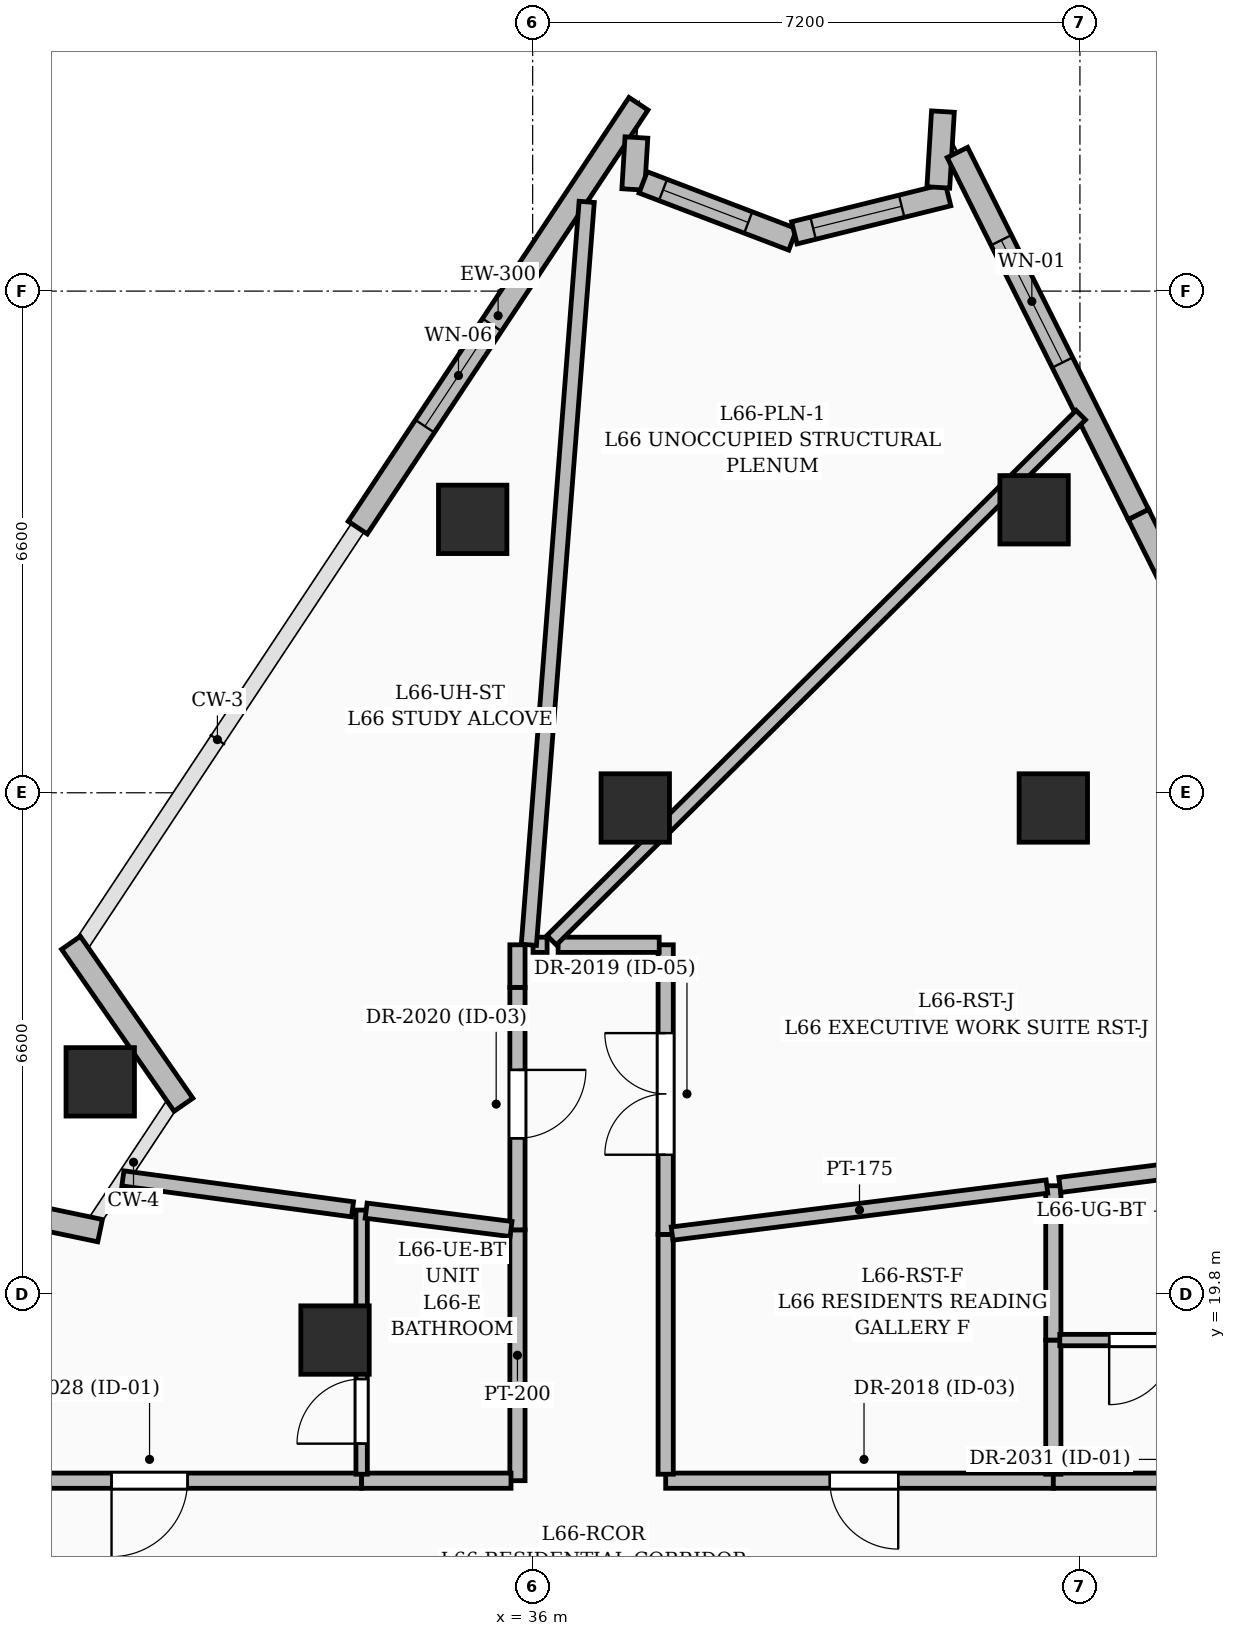
"""IFC4 building model, lengths in metres.
Left out: names, types, materials, properties, quantities, classifications, styles, units other than length and angle.
Written with IfcOpenShell. Run it as: python <this file> out.ifc"""

import sys

from ifc_helpers import new_model, si_unit, direction, frame, frame_2d, origin, origin_2d, place, context, subcontext, project, spatial, rectangle, extrude, element, fill, save


model = new_model("IFC4")
c1 = context("Model", 3, precision=1e-05, world=origin(), true_north=direction((0.0, 1.0)))
c2 = subcontext(c1, "Body", "Model", "MODEL_VIEW")
j1 = project(units=[si_unit("LENGTHUNIT", "METRE"), si_unit("PLANEANGLEUNIT", "RADIAN")], contexts=[c1])
p1 = place(None, origin())
s1 = spatial("IfcSite", under=j1, at=p1, CompositionType="ELEMENT")
p2 = place(p1, origin())
s2 = spatial("IfcBuilding", under=s1, at=p2, CompositionType="ELEMENT")
p3 = place(p2, frame((0.0, 0.0, 255.75)))
s3 = spatial("IfcBuildingStorey", under=s2, at=p3, CompositionType="ELEMENT", Elevation=255.75)
for number, where, z_axis, x_axis in (
    (1, (42.85, 26.2, 0.0), (0.0, 0.0, 1.0), (1.0, 0.0, 0.0)),
    (2, (37.35, 26.2, 0.0), (0.0, 0.0, 1.0), (1.0, 0.0, 0.0)),
    (3, (33.4, 19.2, 0.0), (0.0, 0.0, 1.0), (1.0, 0.0, 0.0)),
    (4, (42.597, 30.123, 0.0), (0.0, 0.0, 1.0), (1.0, 0.0, 0.0)),
    (5, (35.211, 29.997, 0.0), (0.0, 0.0, 1.0), (1.0, 0.0, 0.0)),
    (6, (30.311, 22.597, 0.0), (0.0, 0.0, 1.0), (1.0, 0.0, 0.0)),
):
    element("IfcColumn", number, at=place(p3, frame(where, z_axis=z_axis, x_axis=x_axis)), inside=s3, PredefinedType="COLUMN", context=c2, shape_type="SweptSolid", body=[
        extrude(rectangle(XDim=0.9, YDim=0.9, at=origin_2d()), origin(), (0.0, 0.0, 1.0), 3.75),
    ])
p4 = place(p3, frame((27.771, 21.171, 0.0), z_axis=(0.0, 0.0, 1.0), x_axis=(0.978788869041, -0.204871544732, 0.0)))
e7 = element("IfcWall", 7, at=p4, inside=s3, PredefinedType="SOLIDWALL", context=c2, shape_type="SweptSolid", body=[
    extrude(rectangle(XDim=2.593, YDim=0.3, at=frame_2d((1.296, 0.0))), origin(), (0.0, 0.0, 1.0), 2.825),
])
p5 = place(p4, frame((0.675, 0.0, 0.8)))
e8 = element("IfcOpeningElement", 8, at=p5, cuts=e7, PredefinedType="OPENING", context=c2, shape_type="SweptSolid", body=[
    extrude(rectangle(XDim=1.2, YDim=1.8, at=frame_2d((0.6, 0.9))), frame((0.0, 0.16, 0.0), z_axis=(0.0, -1.0, 0.0), x_axis=(1.0, 0.0, 0.0)), (0.0, 0.0, 1.0), 0.32),
])
p6 = place(p3, frame((31.406, 22.296, 0.0), z_axis=(0.0, 0.0, 1.0), x_axis=(-0.570584534013, 0.821238874838, 0.0)))
e9 = element("IfcWall", 9, at=p6, inside=s3, PredefinedType="SOLIDWALL", context=c2, shape_type="SweptSolid", body=[
    extrude(rectangle(XDim=2.594, YDim=0.3, at=frame_2d((1.297, 0.0))), origin(), (0.0, 0.0, 1.0), 2.825),
])
p7 = place(p3, frame((33.699, 29.888, 0.0), z_axis=(0.0, 0.0, 1.0), x_axis=(0.552111744248, 0.833770125312, 0.0)))
e10 = element("IfcWall", 10, at=p7, inside=s3, PredefinedType="SOLIDWALL", context=c2, shape_type="SweptSolid", body=[
    extrude(rectangle(XDim=6.689, YDim=0.3, at=frame_2d((3.344, 0.0))), origin(), (0.0, 0.0, 1.0), 3.5),
])
p8 = place(p7, frame((1.6, 0.0, 0.55)))
e11 = element("IfcOpeningElement", 11, at=p8, cuts=e10, PredefinedType="OPENING", context=c2, shape_type="SweptSolid", body=[
    extrude(rectangle(XDim=1.6, YDim=2.2, at=frame_2d((0.8, 1.1))), frame((0.0, 0.16, 0.0), z_axis=(0.0, -1.0, 0.0), x_axis=(1.0, 0.0, 0.0)), (0.0, 0.0, 1.0), 0.32),
])
p9 = place(p3, frame((37.365, 35.021, 0.0), z_axis=(0.0, 0.0, 1.0), x_axis=(-0.060624262888, -0.998160657785, 0.0)))
e12 = element("IfcWall", 12, at=p9, inside=s3, PredefinedType="SOLIDWALL", context=c2, shape_type="SweptSolid", body=[
    extrude(rectangle(XDim=0.685, YDim=0.3, at=frame_2d((0.342, 0.0))), origin(), (0.0, 0.0, 1.0), 3.5),
])
p10 = place(p3, frame((37.454, 34.431, 0.0), z_axis=(0.0, 0.0, 1.0), x_axis=(0.934285742141, -0.356525107155, 0.0)))
e13 = element("IfcWall", 13, at=p10, inside=s3, PredefinedType="SOLIDWALL", context=c2, shape_type="SweptSolid", body=[
    extrude(rectangle(XDim=2.108, YDim=0.3, at=frame_2d((1.054, 0.0))), origin(), (0.0, 0.0, 1.0), 3.5),
])
p11 = place(p10, frame((0.28, 0.0, 0.8)))
e14 = element("IfcOpeningElement", 14, at=p11, cuts=e13, PredefinedType="OPENING", context=c2, shape_type="SweptSolid", body=[
    extrude(rectangle(XDim=1.2, YDim=1.8, at=frame_2d((0.6, 0.9))), frame((0.0, 0.16, 0.0), z_axis=(0.0, -1.0, 0.0), x_axis=(1.0, 0.0, 0.0)), (0.0, 0.0, 1.0), 0.32),
])
p12 = place(p3, frame((39.442, 33.766, 0.0), z_axis=(0.0, 0.0, 1.0), x_axis=(0.970636719037, 0.240550118805, 0.0)))
e15 = element("IfcWall", 15, at=p12, inside=s3, PredefinedType="SOLIDWALL", context=c2, shape_type="SweptSolid", body=[
    extrude(rectangle(XDim=2.084, YDim=0.3, at=frame_2d((1.042, 0.0))), origin(), (0.0, 0.0, 1.0), 3.5),
])
p13 = place(p12, frame((0.255, 0.0, 0.8)))
e16 = element("IfcOpeningElement", 16, at=p13, cuts=e15, PredefinedType="OPENING", context=c2, shape_type="SweptSolid", body=[
    extrude(rectangle(XDim=1.2, YDim=1.8, at=frame_2d((0.6, 0.9))), frame((0.0, 0.16, 0.0), z_axis=(0.0, -1.0, 0.0), x_axis=(1.0, 0.0, 0.0)), (0.0, 0.0, 1.0), 0.32),
])
p14 = place(p3, frame((41.337, 34.364, 0.0), z_axis=(0.0, 0.0, 1.0), x_axis=(0.060554036278, 0.998164920587, 0.0)))
e17 = element("IfcWall", 17, at=p14, inside=s3, PredefinedType="SOLIDWALL", context=c2, shape_type="SweptSolid", body=[
    extrude(rectangle(XDim=1.0, YDim=0.3, at=frame_2d((0.5, 0.0))), origin(), (0.0, 0.0, 1.0), 3.5),
])
p15 = place(p3, frame((41.588, 34.824, 0.0), z_axis=(0.0, 0.0, 1.0), x_axis=(0.4472135955, -0.894427191, 0.0)))
e18 = element("IfcWall", 18, at=p15, inside=s3, PredefinedType="SOLIDWALL", context=c2, shape_type="SweptSolid", body=[
    extrude(rectangle(XDim=5.326, YDim=0.3, at=frame_2d((2.663, 0.0))), origin(), (0.0, 0.0, 1.0), 3.5),
])
p16 = place(p15, frame((1.29, 0.0, 0.6)))
e19 = element("IfcOpeningElement", 19, at=p16, cuts=e18, PredefinedType="OPENING", context=c2, shape_type="SweptSolid", body=[
    extrude(rectangle(XDim=1.8, YDim=2.1, at=frame_2d((0.9, 1.05))), frame((0.0, 0.16, 0.0), z_axis=(0.0, -1.0, 0.0), x_axis=(1.0, 0.0, 0.0)), (0.0, 0.0, 1.0), 0.32),
])
p17 = place(p3, frame((43.97, 30.06, 0.0), z_axis=(0.0, 0.0, 1.0), x_axis=(0.447246638907, -0.894410668534, 0.0)))
e20 = element("IfcWall", 20, at=p17, inside=s3, PredefinedType="SOLIDWALL", context=c2, shape_type="SweptSolid", body=[
    extrude(rectangle(XDim=5.911, YDim=0.3, at=frame_2d((2.955, 0.0))), origin(), (0.0, 0.0, 1.0), 3.5),
])
p18 = place(p17, frame((2.1, 0.0, 0.55)))
e21 = element("IfcOpeningElement", 21, at=p18, cuts=e20, PredefinedType="OPENING", context=c2, shape_type="SweptSolid", body=[
    extrude(rectangle(XDim=1.6, YDim=2.2, at=frame_2d((0.8, 1.1))), frame((0.0, 0.16, 0.0), z_axis=(0.0, -1.0, 0.0), x_axis=(1.0, 0.0, 0.0)), (0.0, 0.0, 1.0), 0.32),
])
p19 = place(p3, frame((33.75, 17.35, 0.0), z_axis=(0.0, 0.0, 1.0), x_axis=(-1.0, 0.0, 0.0)))
e22 = element("IfcWall", 22, at=p19, inside=s3, PredefinedType="PARTITIONING", context=c2, shape_type="SweptSolid", body=[
    extrude(rectangle(XDim=5.7, YDim=0.2, at=frame_2d((2.85, 0.0))), origin(), (0.0, 0.0, 1.0), 3.5),
])
p20 = place(p19, frame((2.29, 0.0, 0.0)))
e23 = element("IfcOpeningElement", 23, at=p20, cuts=e22, PredefinedType="OPENING", context=c2, shape_type="SweptSolid", body=[
    extrude(rectangle(XDim=1.0, YDim=2.2, at=frame_2d((0.5, 1.1))), frame((0.0, 0.11, 0.0), z_axis=(0.0, -1.0, 0.0), x_axis=(1.0, 0.0, 0.0)), (0.0, 0.0, 1.0), 0.22),
])
p21 = place(p3, frame((35.8, 20.65, 0.0), z_axis=(0.0, 0.0, 1.0), x_axis=(0.0, -1.0, 0.0)))
e24 = element("IfcWall", 24, at=p21, inside=s3, PredefinedType="PARTITIONING", context=c2, shape_type="SweptSolid", body=[
    extrude(rectangle(XDim=3.3, YDim=0.2, at=frame_2d((1.65, 0.0))), origin(), (0.0, 0.0, 1.0), 3.5),
])
p22 = place(p3, frame((35.715, 17.35, 0.0), z_axis=(0.0, 0.0, 1.0), x_axis=(-1.0, 0.0, 0.0)))
e25 = element("IfcWall", 25, at=p22, inside=s3, PredefinedType="PARTITIONING", context=c2, shape_type="SweptSolid", body=[
    extrude(rectangle(XDim=1.965, YDim=0.2, at=frame_2d((0.982, 0.0))), origin(), (0.0, 0.0, 1.0), 2.685),
])
p23 = place(p3, frame((42.85, 17.35, 0.0), z_axis=(0.0, 0.0, 1.0), x_axis=(-1.0, 0.0, 0.0)))
e26 = element("IfcWall", 26, at=p23, inside=s3, PredefinedType="PARTITIONING", context=c2, shape_type="SweptSolid", body=[
    extrude(rectangle(XDim=5.1, YDim=0.2, at=frame_2d((2.55, 0.0))), origin(), (0.0, 0.0, 1.0), 3.5),
])
p24 = place(p23, frame((2.041, 0.0, 0.0)))
e27 = element("IfcOpeningElement", 27, at=p24, cuts=e26, PredefinedType="OPENING", context=c2, shape_type="SweptSolid", body=[
    extrude(rectangle(XDim=0.9, YDim=2.1, at=frame_2d((0.45, 1.05))), frame((0.0, 0.11, 0.0), z_axis=(0.0, -1.0, 0.0), x_axis=(1.0, 0.0, 0.0)), (0.0, 0.0, 1.0), 0.22),
])
p25 = place(p3, frame((37.75, 17.435, 0.0), z_axis=(0.0, 0.0, 1.0), x_axis=(0.0, 1.0, 0.0)))
e28 = element("IfcWall", 28, at=p25, inside=s3, PredefinedType="PARTITIONING", context=c2, shape_type="SweptSolid", body=[
    extrude(rectangle(XDim=3.155, YDim=0.2, at=frame_2d((1.578, 0.0))), origin(), (0.0, 0.0, 1.0), 3.5),
])
p26 = place(p3, frame((46.715, 17.35, 0.0), z_axis=(0.0, 0.0, 1.0), x_axis=(-1.0, 0.0, 0.0)))
e29 = element("IfcWall", 29, at=p26, inside=s3, PredefinedType="PARTITIONING", context=c2, shape_type="SweptSolid", body=[
    extrude(rectangle(XDim=3.865, YDim=0.2, at=frame_2d((1.933, 0.0))), origin(), (0.0, 0.0, 1.0), 2.685),
])
p27 = place(p26, frame((1.332, 0.0, 0.0)))
e30 = element("IfcOpeningElement", 30, at=p27, cuts=e29, PredefinedType="OPENING", context=c2, shape_type="SweptSolid", body=[
    extrude(rectangle(XDim=1.0, YDim=2.2, at=frame_2d((0.5, 1.1))), frame((0.0, 0.11, 0.0), z_axis=(0.0, -1.0, 0.0), x_axis=(1.0, 0.0, 0.0)), (0.0, 0.0, 1.0), 0.22),
])
p28 = place(p3, frame((35.8, 23.84, 0.0), z_axis=(0.0, 0.0, 1.0), x_axis=(0.0, -1.0, 0.0)))
e31 = element("IfcWall", 31, at=p28, inside=s3, PredefinedType="PARTITIONING", context=c2, shape_type="SweptSolid", body=[
    extrude(rectangle(XDim=3.19, YDim=0.2, at=frame_2d((1.595, 0.0))), origin(), (0.0, 0.0, 1.0), 2.685),
])
p29 = place(p28, frame((1.086, 0.0, 0.0)))
e32 = element("IfcOpeningElement", 32, at=p29, cuts=e31, PredefinedType="OPENING", context=c2, shape_type="SweptSolid", body=[
    extrude(rectangle(XDim=0.9, YDim=2.1, at=frame_2d((0.45, 1.05))), frame((0.0, 0.11, 0.0), z_axis=(0.0, -1.0, 0.0), x_axis=(1.0, 0.0, 0.0)), (0.0, 0.0, 1.0), 0.22),
])
p30 = place(p3, frame((35.8, 24.4, 0.0), z_axis=(0.0, 0.0, 1.0), x_axis=(0.0, -1.0, 0.0)))
e33 = element("IfcWall", 33, at=p30, inside=s3, PredefinedType="PARTITIONING", context=c2, shape_type="SweptSolid", body=[
    extrude(rectangle(XDim=0.56, YDim=0.2, at=frame_2d((0.28, 0.0))), origin(), (0.0, 0.0, 1.0), 2.685),
])
p31 = place(p3, frame((37.75, 20.59, 0.0), z_axis=(0.0, 0.0, 1.0), x_axis=(0.0, 1.0, 0.0)))
e34 = element("IfcWall", 34, at=p31, inside=s3, PredefinedType="PARTITIONING", context=c2, shape_type="SweptSolid", body=[
    extrude(rectangle(XDim=3.81, YDim=0.2, at=frame_2d((1.905, 0.0))), origin(), (0.0, 0.0, 1.0), 3.5),
])
p32 = place(p31, frame((1.048, 0.0, 0.0)))
e35 = element("IfcOpeningElement", 35, at=p32, cuts=e34, PredefinedType="OPENING", context=c2, shape_type="SweptSolid", body=[
    extrude(rectangle(XDim=1.6, YDim=2.3, at=frame_2d((0.8, 1.15))), frame((0.0, 0.11, 0.0), z_axis=(0.0, -1.0, 0.0), x_axis=(1.0, 0.0, 0.0)), (0.0, 0.0, 1.0), 0.22),
])
p33 = place(p3, frame((37.665, 24.4, 0.0), z_axis=(0.0, 0.0, 1.0), x_axis=(-1.0, 0.0, 0.0)))
e36 = element("IfcWall", 36, at=p33, inside=s3, PredefinedType="PARTITIONING", context=c2, shape_type="SweptSolid", body=[
    extrude(rectangle(XDim=1.33, YDim=0.2, at=frame_2d((0.665, 0.0))), origin(), (0.0, 0.0, 1.0), 2.685),
])
p34 = place(p3, frame((36.19, 24.4, 0.0), z_axis=(0.0, 0.0, 1.0), x_axis=(-1.0, 0.0, 0.0)))
e37 = element("IfcWall", 37, at=p34, inside=s3, PredefinedType="PARTITIONING", context=c2, shape_type="SweptSolid", body=[
    extrude(rectangle(XDim=0.185, YDim=0.2, at=frame_2d((0.093, 0.0))), origin(), (0.0, 0.0, 1.0), 2.685),
])
p35 = place(p3, frame((33.75, 17.435, 0.0), z_axis=(0.0, 0.0, 1.0), x_axis=(0.0, 1.0, 0.0)))
e38 = element("IfcWall", 38, at=p35, inside=s3, PredefinedType="PARTITIONING", context=c2, shape_type="SweptSolid", body=[
    extrude(rectangle(XDim=3.475, YDim=0.15, at=frame_2d((1.737, 0.0))), origin(), (0.0, 0.0, 1.0), 2.685),
])
p36 = place(p35, frame((0.402, 0.0, 0.0)))
e39 = element("IfcOpeningElement", 39, at=p36, cuts=e38, PredefinedType="OPENING", context=c2, shape_type="SweptSolid", body=[
    extrude(rectangle(XDim=0.85, YDim=2.1, at=frame_2d((0.425, 1.05))), frame((0.0, 0.085, 0.0), z_axis=(0.0, -1.0, 0.0), x_axis=(1.0, 0.0, 0.0)), (0.0, 0.0, 1.0), 0.17),
])
p37 = place(p3, frame((33.63, 20.92, 0.0), z_axis=(0.0, 0.0, 1.0), x_axis=(-0.991047215952, 0.13351185623, 0.0)))
e40 = element("IfcWall", 40, at=p37, inside=s3, PredefinedType="PARTITIONING", context=c2, shape_type="SweptSolid", body=[
    extrude(rectangle(XDim=3.048, YDim=0.2, at=frame_2d((1.524, 0.0))), origin(), (0.0, 0.0, 1.0), 2.764),
])
p38 = place(p3, frame((35.716, 20.661, 0.0), z_axis=(0.0, 0.0, 1.0), x_axis=(-0.992041540235, 0.125911010037, 0.0)))
e41 = element("IfcWall", 41, at=p38, inside=s3, PredefinedType="PARTITIONING", context=c2, shape_type="SweptSolid", body=[
    extrude(rectangle(XDim=1.922, YDim=0.2, at=frame_2d((0.961, 0.0))), origin(), (0.0, 0.0, 1.0), 2.685),
])
p39 = place(p3, frame((42.85, 17.435, 0.0), z_axis=(0.0, 0.0, 1.0), x_axis=(0.0, 1.0, 0.0)))
e42 = element("IfcWall", 42, at=p39, inside=s3, PredefinedType="PARTITIONING", context=c2, shape_type="SweptSolid", body=[
    extrude(rectangle(XDim=1.765, YDim=0.2, at=frame_2d((0.882, 0.0))), origin(), (0.0, 0.0, 1.0), 3.5),
])
p40 = place(p3, frame((42.85, 19.2, 0.0), z_axis=(0.0, 0.0, 1.0), x_axis=(0.0, 1.0, 0.0)))
e43 = element("IfcWall", 43, at=p40, inside=s3, PredefinedType="PARTITIONING", context=c2, shape_type="SweptSolid", body=[
    extrude(rectangle(XDim=2.03, YDim=0.2, at=frame_2d((1.015, 0.0))), origin(), (0.0, 0.0, 1.0), 3.5),
])
p41 = place(p3, frame((42.766, 21.219, 0.0), z_axis=(0.0, 0.0, 1.0), x_axis=(-0.992216542226, -0.124524428662, 0.0)))
e44 = element("IfcWall", 44, at=p41, inside=s3, PredefinedType="PARTITIONING", context=c2, shape_type="SweptSolid", body=[
    extrude(rectangle(XDim=4.97, YDim=0.175, at=frame_2d((2.485, 0.0))), origin(), (0.0, 0.0, 1.0), 3.5),
])
p42 = place(p3, frame((45.05, 19.2, 0.0), z_axis=(0.0, 0.0, 1.0), x_axis=(-1.0, 0.0, 0.0)))
e45 = element("IfcWall", 45, at=p42, inside=s3, PredefinedType="PARTITIONING", context=c2, shape_type="SweptSolid", body=[
    extrude(rectangle(XDim=2.115, YDim=0.15, at=frame_2d((1.058, 0.0))), origin(), (0.0, 0.0, 1.0), 3.5),
])
p43 = place(p42, frame((0.615, 0.0, 0.0)))
e46 = element("IfcOpeningElement", 46, at=p43, cuts=e45, PredefinedType="OPENING", context=c2, shape_type="SweptSolid", body=[
    extrude(rectangle(XDim=0.85, YDim=2.1, at=frame_2d((0.425, 1.05))), frame((0.0, 0.085, 0.0), z_axis=(0.0, -1.0, 0.0), x_axis=(1.0, 0.0, 0.0)), (0.0, 0.0, 1.0), 0.17),
])
p44 = place(p3, frame((44.99, 21.502, 0.0), z_axis=(0.0, 0.0, 1.0), x_axis=(-0.991996302331, -0.126266924258, 0.0)))
e47 = element("IfcWall", 47, at=p44, inside=s3, PredefinedType="PARTITIONING", context=c2, shape_type="SweptSolid", body=[
    extrude(rectangle(XDim=2.073, YDim=0.2, at=frame_2d((1.036, 0.0))), origin(), (0.0, 0.0, 1.0), 2.685),
])
p45 = place(p3, frame((35.95, 24.4, 0.0), z_axis=(0.0, 0.0, 1.0), x_axis=(0.077621970398, 0.996982863299, 0.0)))
e48 = element("IfcWall", 48, at=p45, inside=s3, PredefinedType="PARTITIONING", context=c2, shape_type="SweptSolid", body=[
    extrude(rectangle(XDim=9.804, YDim=0.2, at=frame_2d((4.902, 0.0))), origin(), (0.0, 0.0, 1.0), 2.764),
])
p46 = place(p3, frame((43.211, 31.369, 0.0), z_axis=(0.0, 0.0, 1.0), x_axis=(-0.709740576129, -0.704463139275, 0.0)))
e49 = element("IfcWall", 49, at=p46, inside=s3, PredefinedType="PARTITIONING", context=c2, shape_type="SweptSolid", body=[
    extrude(rectangle(XDim=9.807, YDim=0.175, at=frame_2d((4.904, 0.0))), origin(), (0.0, 0.0, 1.0), 2.685),
])
p47 = place(p8, origin())
e50 = element("IfcWindow", 50, at=p47, inside=s3, PartitioningType="SINGLE_PANEL", PredefinedType="WINDOW", context=c2, shape_type="SweptSolid", body=[
    extrude(rectangle(XDim=1.6, YDim=2.2, at=frame_2d((0.8, 1.1))), frame((0.0, 0.03, 0.0), z_axis=(0.0, -1.0, 0.0), x_axis=(1.0, 0.0, 0.0)), (0.0, 0.0, 1.0), 0.06),
])
fill(e11, e50)
p48 = place(p11, origin())
e51 = element("IfcWindow", 51, at=p48, inside=s3, PartitioningType="SINGLE_PANEL", PredefinedType="WINDOW", context=c2, shape_type="SweptSolid", body=[
    extrude(rectangle(XDim=1.2, YDim=1.8, at=frame_2d((0.6, 0.9))), frame((0.0, 0.03, 0.0), z_axis=(0.0, -1.0, 0.0), x_axis=(1.0, 0.0, 0.0)), (0.0, 0.0, 1.0), 0.06),
])
fill(e14, e51)
p49 = place(p13, origin())
e52 = element("IfcWindow", 52, at=p49, inside=s3, PartitioningType="SINGLE_PANEL", PredefinedType="WINDOW", context=c2, shape_type="SweptSolid", body=[
    extrude(rectangle(XDim=1.2, YDim=1.8, at=frame_2d((0.6, 0.9))), frame((0.0, 0.03, 0.0), z_axis=(0.0, -1.0, 0.0), x_axis=(1.0, 0.0, 0.0)), (0.0, 0.0, 1.0), 0.06),
])
fill(e16, e52)
p50 = place(p16, origin())
e53 = element("IfcWindow", 53, at=p50, inside=s3, PartitioningType="SINGLE_PANEL", PredefinedType="WINDOW", context=c2, shape_type="SweptSolid", body=[
    extrude(rectangle(XDim=1.8, YDim=2.1, at=frame_2d((0.9, 1.05))), frame((0.0, 0.03, 0.0), z_axis=(0.0, -1.0, 0.0), x_axis=(1.0, 0.0, 0.0)), (0.0, 0.0, 1.0), 0.06),
])
fill(e19, e53)
p51 = place(p24, origin())
e54 = element("IfcDoor", 54, at=p51, inside=s3, OperationType="SINGLE_SWING_LEFT", PredefinedType="DOOR", context=c2, shape_type="SweptSolid", body=[
    extrude(rectangle(XDim=0.9, YDim=2.1, at=frame_2d((0.45, 1.05))), frame((0.0, 0.025, 0.0), z_axis=(0.0, -1.0, 0.0), x_axis=(1.0, 0.0, 0.0)), (0.0, 0.0, 1.0), 0.05),
])
fill(e27, e54)
p52 = place(p32, origin())
e55 = element("IfcDoor", 55, at=p52, inside=s3, OperationType="DOUBLE_DOOR_SINGLE_SWING", PredefinedType="DOOR", context=c2, shape_type="SweptSolid", body=[
    extrude(rectangle(XDim=1.6, YDim=2.3, at=frame_2d((0.8, 1.15))), frame((0.0, 0.025, 0.0), z_axis=(0.0, -1.0, 0.0), x_axis=(1.0, 0.0, 0.0)), (0.0, 0.0, 1.0), 0.05),
])
fill(e35, e55)
p53 = place(p29, origin())
e56 = element("IfcDoor", 56, at=p53, inside=s3, OperationType="SINGLE_SWING_LEFT", PredefinedType="DOOR", context=c2, shape_type="SweptSolid", body=[
    extrude(rectangle(XDim=0.9, YDim=2.1, at=frame_2d((0.45, 1.05))), frame((0.0, 0.025, 0.0), z_axis=(0.0, -1.0, 0.0), x_axis=(1.0, 0.0, 0.0)), (0.0, 0.0, 1.0), 0.05),
])
fill(e32, e56)
p54 = place(p20, origin())
e57 = element("IfcDoor", 57, at=p54, inside=s3, OperationType="SINGLE_SWING_RIGHT", PredefinedType="DOOR", context=c2, shape_type="SweptSolid", body=[
    extrude(rectangle(XDim=1.0, YDim=2.2, at=frame_2d((0.5, 1.1))), frame((0.0, 0.025, 0.0), z_axis=(0.0, -1.0, 0.0), x_axis=(1.0, 0.0, 0.0)), (0.0, 0.0, 1.0), 0.05),
])
fill(e23, e57)
p55 = place(p36, origin())
e58 = element("IfcDoor", 58, at=p55, inside=s3, OperationType="SINGLE_SWING_LEFT", PredefinedType="DOOR", context=c2, shape_type="SweptSolid", body=[
    extrude(rectangle(XDim=0.85, YDim=2.1, at=frame_2d((0.425, 1.05))), frame((0.0, 0.025, 0.0), z_axis=(0.0, -1.0, 0.0), x_axis=(1.0, 0.0, 0.0)), (0.0, 0.0, 1.0), 0.05),
])
fill(e39, e58)
p56 = place(p43, origin())
e59 = element("IfcDoor", 59, at=p56, inside=s3, OperationType="SINGLE_SWING_RIGHT", PredefinedType="DOOR", context=c2, shape_type="SweptSolid", body=[
    extrude(rectangle(XDim=0.85, YDim=2.1, at=frame_2d((0.425, 1.05))), frame((0.0, 0.025, 0.0), z_axis=(0.0, -1.0, 0.0), x_axis=(1.0, 0.0, 0.0)), (0.0, 0.0, 1.0), 0.05),
])
fill(e46, e59)
save(model, sys.argv[1])
